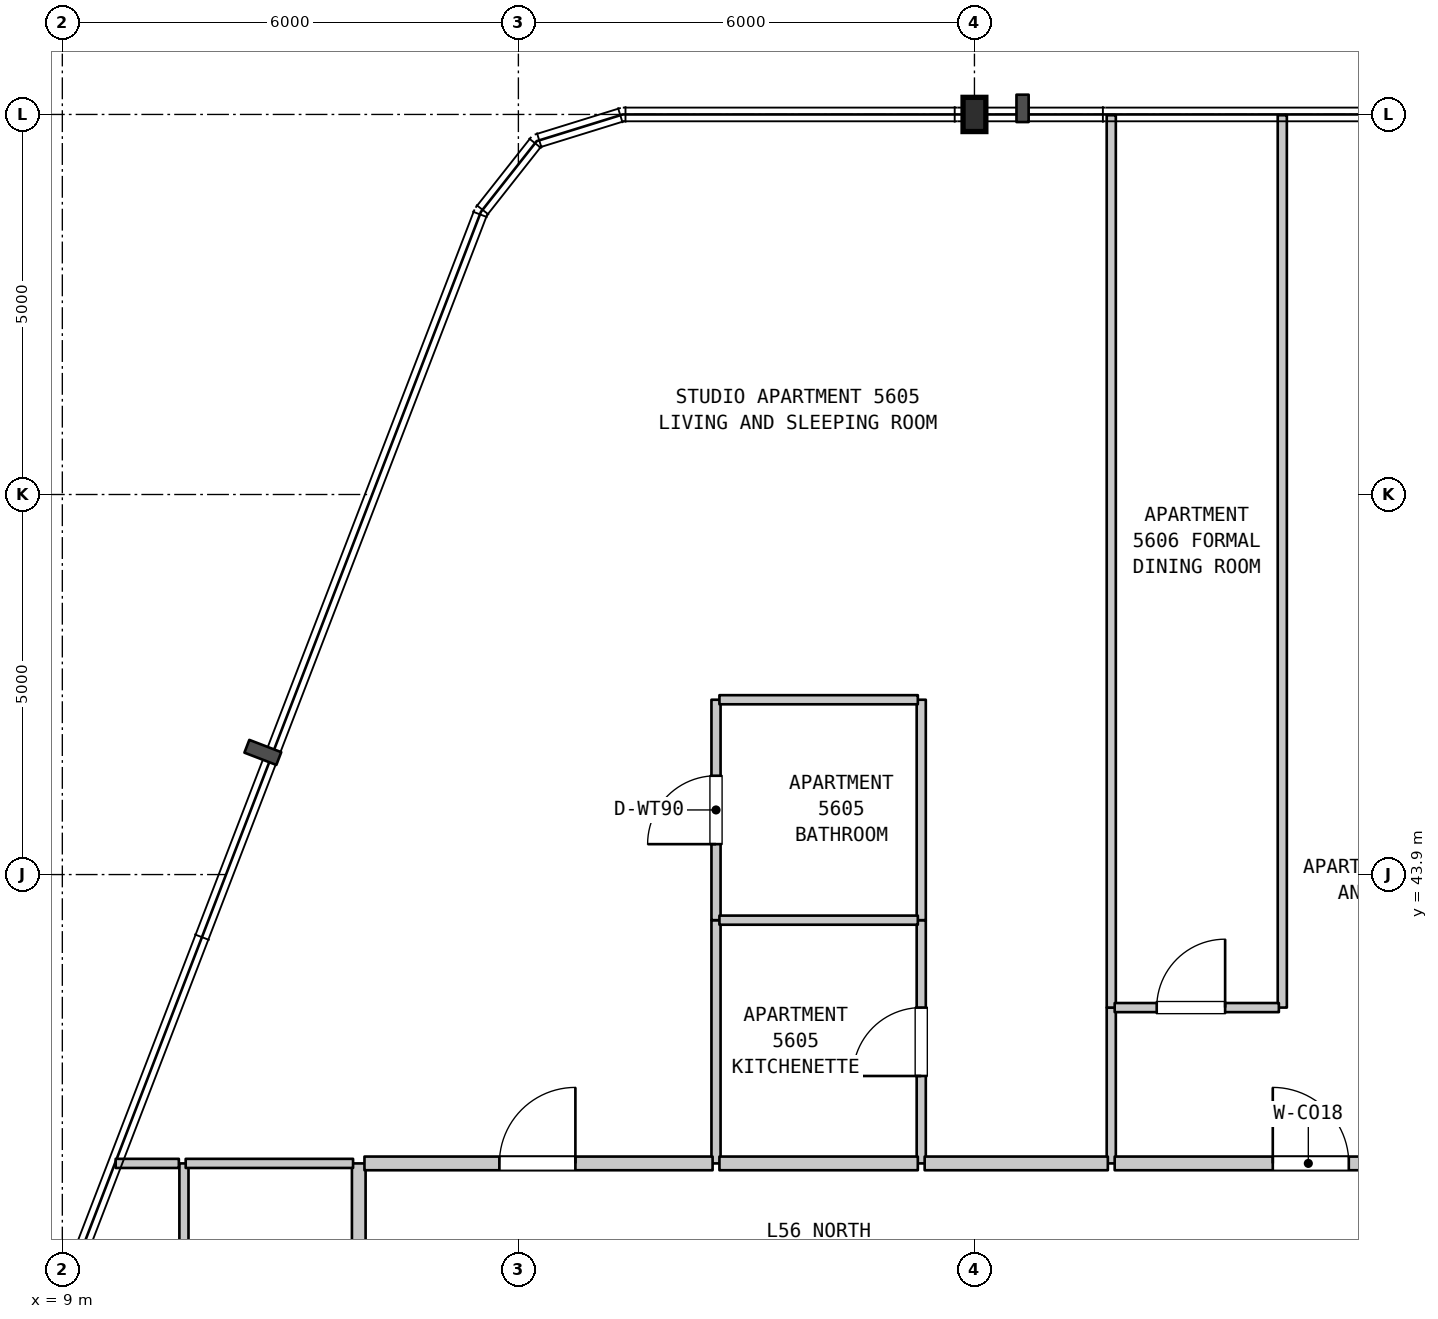
"""IFC4 building model, lengths in metres.
Left out: names, types, materials, properties, quantities, classifications, styles, units other than length and angle.
Written with IfcOpenShell. Run it as: python <this file> out.ifc"""

import sys

from ifc_helpers import new_model, si_unit, direction, frame, frame_2d, origin, origin_2d, place, context, subcontext, project, spatial, rectangle, i_section, extrude, element, fill, save


model = new_model("IFC4")
c1 = context("Model", 3, precision=1e-05, world=origin(), true_north=direction((0.0, 1.0)))
c2 = subcontext(c1, "Body", "Model", "MODEL_VIEW")
j1 = project(units=[si_unit("LENGTHUNIT", "METRE"), si_unit("PLANEANGLEUNIT", "RADIAN")], contexts=[c1])
p1 = place(None, origin())
s1 = spatial("IfcSite", under=j1, at=p1, CompositionType="ELEMENT")
p2 = place(p1, origin())
s2 = spatial("IfcBuilding", under=s1, at=p2, CompositionType="ELEMENT")
p3 = place(p2, frame((0.0, 0.0, 226.5)))
s3 = spatial("IfcBuildingStorey", under=s2, at=p3, CompositionType="ELEMENT", Elevation=226.5)
p4 = place(p3, frame((21.0, 53.9, 0.0), z_axis=(0.0, 0.0, 1.0), x_axis=(1.0, 0.0, 0.0)))
e1 = element("IfcColumn", 1, at=p4, inside=s3, PredefinedType="COLUMN", context=c2, shape_type="SweptSolid", body=[
    extrude(i_section(OverallWidth=0.3, OverallDepth=0.45, WebThickness=0.014, FlangeThickness=0.026, FilletRadius=0.027, at=origin_2d()), origin(), (0.0, 0.0, 1.0), 3.7),
])
p5 = place(p3, frame((10.6, 35.59, 0.0), z_axis=(0.0, 0.0, 1.0), x_axis=(0.0, 1.0, 0.0)))
e2 = element("IfcWall", 2, at=p5, inside=s3, PredefinedType="PARTITIONING", context=c2, shape_type="SweptSolid", body=[
    extrude(rectangle(XDim=4.51, YDim=0.12, at=frame_2d((2.255, 0.0))), origin(), (0.0, 0.0, 1.0), 3.39),
])
p6 = place(p3, frame((12.9, 35.59, 0.0), z_axis=(0.0, 0.0, 1.0), x_axis=(0.0, 1.0, 0.0)))
e3 = element("IfcWall", 3, at=p6, inside=s3, PredefinedType="STANDARD", context=c2, shape_type="SweptSolid", body=[
    extrude(rectangle(XDim=4.51, YDim=0.18, at=frame_2d((2.255, 0.0))), origin(), (0.0, 0.0, 1.0), 3.39),
])
p7 = place(p3, frame((17.6, 40.1, 0.0), z_axis=(0.0, 0.0, 1.0), x_axis=(0.0, 1.0, 0.0)))
e4 = element("IfcWall", 4, at=p7, inside=s3, PredefinedType="PARTITIONING", context=c2, shape_type="SweptSolid", body=[
    extrude(rectangle(XDim=3.2, YDim=0.12, at=frame_2d((1.6, 0.0))), origin(), (0.0, 0.0, 1.0), 3.39),
])
p8 = place(p3, frame((17.6, 43.3, 0.0), z_axis=(0.0, 0.0, 1.0), x_axis=(0.0, 1.0, 0.0)))
e5 = element("IfcWall", 5, at=p8, inside=s3, PredefinedType="PARTITIONING", context=c2, shape_type="SweptSolid", body=[
    extrude(rectangle(XDim=2.9, YDim=0.12, at=frame_2d((1.45, 0.0))), origin(), (0.0, 0.0, 1.0), 3.39),
])
p9 = place(p8, frame((1.0, 0.0, 0.0)))
e6 = element("IfcOpeningElement", 6, at=p9, cuts=e5, PredefinedType="OPENING", context=c2, shape_type="SweptSolid", body=[
    extrude(rectangle(XDim=0.9, YDim=2.1, at=frame_2d((0.45, 1.05))), frame((0.0, 0.07, 0.0), z_axis=(0.0, -1.0, 0.0), x_axis=(1.0, 0.0, 0.0)), (0.0, 0.0, 1.0), 0.14),
])
p10 = place(p3, frame((20.3, 40.1, 0.0), z_axis=(0.0, 0.0, 1.0), x_axis=(0.0, 1.0, 0.0)))
e7 = element("IfcWall", 7, at=p10, inside=s3, PredefinedType="PARTITIONING", context=c2, shape_type="SweptSolid", body=[
    extrude(rectangle(XDim=3.2, YDim=0.12, at=frame_2d((1.6, 0.0))), origin(), (0.0, 0.0, 1.0), 3.39),
])
p11 = place(p10, frame((1.15, 0.0, 0.0)))
e8 = element("IfcOpeningElement", 8, at=p11, cuts=e7, PredefinedType="OPENING", context=c2, shape_type="SweptSolid", body=[
    extrude(rectangle(XDim=0.9, YDim=2.15, at=frame_2d((0.45, 1.075))), frame((0.0, 0.07, 0.0), z_axis=(0.0, -1.0, 0.0), x_axis=(1.0, 0.0, 0.0)), (0.0, 0.0, 1.0), 0.14),
])
p12 = place(p3, frame((20.3, 43.3, 0.0), z_axis=(0.0, 0.0, 1.0), x_axis=(0.0, 1.0, 0.0)))
e9 = element("IfcWall", 9, at=p12, inside=s3, PredefinedType="PARTITIONING", context=c2, shape_type="SweptSolid", body=[
    extrude(rectangle(XDim=2.9, YDim=0.12, at=frame_2d((1.45, 0.0))), origin(), (0.0, 0.0, 1.0), 3.39),
])
p13 = place(p3, frame((22.8, 40.1, 0.0), z_axis=(0.0, 0.0, 1.0), x_axis=(0.0, 1.0, 0.0)))
e10 = element("IfcWall", 10, at=p13, inside=s3, PredefinedType="PARTITIONING", context=c2, shape_type="SweptSolid", body=[
    extrude(rectangle(XDim=2.05, YDim=0.12, at=frame_2d((1.025, 0.0))), origin(), (0.0, 0.0, 1.0), 3.39),
])
for number, where, z_axis, x_axis in (
    (11, (22.8, 42.15, 0.0), (0.0, 0.0, 1.0), (0.0, 1.0, 0.0)),
    (12, (25.05, 42.15, 0.0), (0.0, 0.0, 1.0), (0.0, 1.0, 0.0)),
):
    element("IfcWall", number, at=place(p3, frame(where, z_axis=z_axis, x_axis=x_axis)), inside=s3, PredefinedType="PARTITIONING", context=c2, shape_type="SweptSolid", body=[
        extrude(rectangle(XDim=11.74, YDim=0.12, at=frame_2d((5.87, 0.0))), origin(), (0.0, 0.0, 1.0), 3.39),
    ])
p14 = place(p3, frame((9.702, 40.1, 0.0), z_axis=(0.0, 0.0, 1.0), x_axis=(1.0, 0.0, 0.0)))
e13 = element("IfcWall", 13, at=p14, inside=s3, PredefinedType="PARTITIONING", context=c2, shape_type="SweptSolid", body=[
    extrude(rectangle(XDim=0.831, YDim=0.12, at=frame_2d((0.416, 0.0))), origin(), (0.0, 0.0, 1.0), 3.39),
])
p15 = place(p3, frame((10.623, 40.1, 0.0), z_axis=(0.0, 0.0, 1.0), x_axis=(1.0, 0.0, 0.0)))
e14 = element("IfcWall", 14, at=p15, inside=s3, PredefinedType="PARTITIONING", context=c2, shape_type="SweptSolid", body=[
    extrude(rectangle(XDim=2.202, YDim=0.12, at=frame_2d((1.101, 0.0))), origin(), (0.0, 0.0, 1.0), 3.39),
])
p16 = place(p3, frame((12.975, 40.1, 0.0), z_axis=(0.0, 0.0, 1.0), x_axis=(1.0, 0.0, 0.0)))
e15 = element("IfcWall", 15, at=p16, inside=s3, PredefinedType="STANDARD", context=c2, shape_type="SweptSolid", body=[
    extrude(rectangle(XDim=4.58, YDim=0.18, at=frame_2d((2.29, 0.0))), origin(), (0.0, 0.0, 1.0), 3.39),
])
p17 = place(p16, frame((1.775, 0.0, 0.0)))
e16 = element("IfcOpeningElement", 16, at=p17, cuts=e15, PredefinedType="OPENING", context=c2, shape_type="SweptSolid", body=[
    extrude(rectangle(XDim=1.0, YDim=2.15, at=frame_2d((0.5, 1.075))), frame((0.0, 0.1, 0.0), z_axis=(0.0, -1.0, 0.0), x_axis=(1.0, 0.0, 0.0)), (0.0, 0.0, 1.0), 0.2),
])
p18 = place(p3, frame((17.645, 40.1, 0.0), z_axis=(0.0, 0.0, 1.0), x_axis=(1.0, 0.0, 0.0)))
e17 = element("IfcWall", 17, at=p18, inside=s3, PredefinedType="STANDARD", context=c2, shape_type="SweptSolid", body=[
    extrude(rectangle(XDim=2.61, YDim=0.18, at=frame_2d((1.305, 0.0))), origin(), (0.0, 0.0, 1.0), 3.39),
])
p19 = place(p3, frame((20.345, 40.1, 0.0), z_axis=(0.0, 0.0, 1.0), x_axis=(1.0, 0.0, 0.0)))
e18 = element("IfcWall", 18, at=p19, inside=s3, PredefinedType="STANDARD", context=c2, shape_type="SweptSolid", body=[
    extrude(rectangle(XDim=2.41, YDim=0.18, at=frame_2d((1.205, 0.0))), origin(), (0.0, 0.0, 1.0), 3.39),
])
p20 = place(p3, frame((22.845, 40.1, 0.0), z_axis=(0.0, 0.0, 1.0), x_axis=(1.0, 0.0, 0.0)))
e19 = element("IfcWall", 19, at=p20, inside=s3, PredefinedType="STANDARD", context=c2, shape_type="SweptSolid", body=[
    extrude(rectangle(XDim=5.095, YDim=0.18, at=frame_2d((2.547, 0.0))), origin(), (0.0, 0.0, 1.0), 3.39),
])
p21 = place(p20, frame((2.08, 0.0, 0.0)))
e20 = element("IfcOpeningElement", 20, at=p21, cuts=e19, PredefinedType="OPENING", context=c2, shape_type="SweptSolid", body=[
    extrude(rectangle(XDim=1.0, YDim=2.15, at=frame_2d((0.5, 1.075))), frame((0.0, 0.1, 0.0), z_axis=(0.0, -1.0, 0.0), x_axis=(1.0, 0.0, 0.0)), (0.0, 0.0, 1.0), 0.2),
])
p22 = place(p3, frame((22.845, 42.15, 0.0), z_axis=(0.0, 0.0, 1.0), x_axis=(1.0, 0.0, 0.0)))
e21 = element("IfcWall", 21, at=p22, inside=s3, PredefinedType="PARTITIONING", context=c2, shape_type="SweptSolid", body=[
    extrude(rectangle(XDim=2.16, YDim=0.12, at=frame_2d((1.08, 0.0))), origin(), (0.0, 0.0, 1.0), 3.39),
])
p23 = place(p22, frame((0.553, 0.0, 0.0)))
e22 = element("IfcOpeningElement", 22, at=p23, cuts=e21, PredefinedType="OPENING", context=c2, shape_type="SweptSolid", body=[
    extrude(rectangle(XDim=0.9, YDim=2.15, at=frame_2d((0.45, 1.075))), frame((0.0, 0.07, 0.0), z_axis=(0.0, -1.0, 0.0), x_axis=(1.0, 0.0, 0.0)), (0.0, 0.0, 1.0), 0.14),
])
for number, where, z_axis, x_axis in (
    (23, (17.645, 43.3, 0.0), (0.0, 0.0, 1.0), (1.0, 0.0, 0.0)),
    (24, (17.645, 46.2, 0.0), (0.0, 0.0, 1.0), (1.0, 0.0, 0.0)),
):
    element("IfcWall", number, at=place(p3, frame(where, z_axis=z_axis, x_axis=x_axis)), inside=s3, PredefinedType="PARTITIONING", context=c2, shape_type="SweptSolid", body=[
        extrude(rectangle(XDim=2.61, YDim=0.12, at=frame_2d((1.305, 0.0))), origin(), (0.0, 0.0, 1.0), 3.39),
    ])
p24 = place(p9, origin())
e25 = element("IfcDoor", 25, at=p24, inside=s3, OperationType="SINGLE_SWING_LEFT", PredefinedType="DOOR", context=c2, shape_type="SweptSolid", body=[
    extrude(rectangle(XDim=0.9, YDim=2.1, at=frame_2d((0.45, 1.05))), frame((0.0, 0.025, 0.0), z_axis=(0.0, -1.0, 0.0), x_axis=(1.0, 0.0, 0.0)), (0.0, 0.0, 1.0), 0.05),
])
fill(e6, e25)
p25 = place(p11, origin())
e26 = element("IfcDoor", 26, at=p25, inside=s3, OperationType="SINGLE_SWING_LEFT", PredefinedType="DOOR", context=c2, shape_type="SweptSolid", body=[
    extrude(rectangle(XDim=0.9, YDim=2.15, at=frame_2d((0.45, 1.075))), frame((0.0, 0.025, 0.0), z_axis=(0.0, -1.0, 0.0), x_axis=(1.0, 0.0, 0.0)), (0.0, 0.0, 1.0), 0.05),
])
fill(e8, e26)
p26 = place(p17, origin())
e27 = element("IfcDoor", 27, at=p26, inside=s3, OperationType="SINGLE_SWING_RIGHT", PredefinedType="DOOR", context=c2, shape_type="SweptSolid", body=[
    extrude(rectangle(XDim=1.0, YDim=2.15, at=frame_2d((0.5, 1.075))), frame((0.0, 0.025, 0.0), z_axis=(0.0, -1.0, 0.0), x_axis=(1.0, 0.0, 0.0)), (0.0, 0.0, 1.0), 0.05),
])
fill(e16, e27)
p27 = place(p21, origin())
e28 = element("IfcDoor", 28, at=p27, inside=s3, OperationType="SINGLE_SWING_LEFT", PredefinedType="DOOR", context=c2, shape_type="SweptSolid", body=[
    extrude(rectangle(XDim=1.0, YDim=2.15, at=frame_2d((0.5, 1.075))), frame((0.0, 0.025, 0.0), z_axis=(0.0, -1.0, 0.0), x_axis=(1.0, 0.0, 0.0)), (0.0, 0.0, 1.0), 0.05),
])
fill(e20, e28)
p28 = place(p23, origin())
e29 = element("IfcDoor", 29, at=p28, inside=s3, OperationType="SINGLE_SWING_RIGHT", PredefinedType="DOOR", context=c2, shape_type="SweptSolid", body=[
    extrude(rectangle(XDim=0.9, YDim=2.15, at=frame_2d((0.45, 1.075))), frame((0.0, 0.025, 0.0), z_axis=(0.0, -1.0, 0.0), x_axis=(1.0, 0.0, 0.0)), (0.0, 0.0, 1.0), 0.05),
])
fill(e22, e29)
save(model, sys.argv[1])
